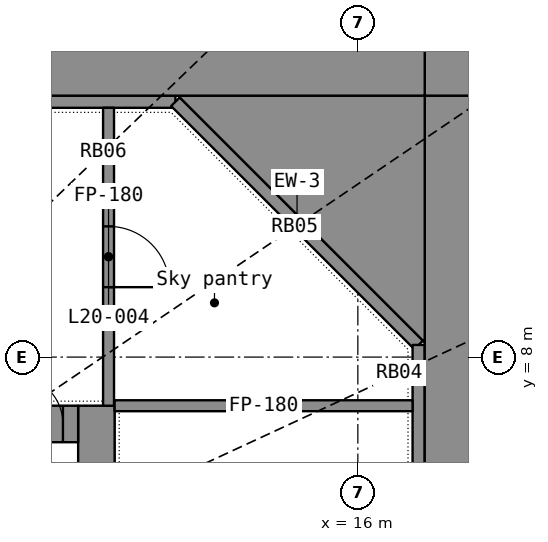
"""IFC4 building model, lengths in metres.
Left out: names, types, materials, properties, quantities, classifications, styles, units other than length and angle.
Written with IfcOpenShell. Run it as: python <this file> out.ifc"""

import sys

from ifc_helpers import new_model, si_unit, direction, frame, frame_2d, origin, place, context, subcontext, project, spatial, polyline, rectangle, outline, extrude, element, fill, save


model = new_model("IFC4")
c1 = context("Model", 3, precision=1e-05, world=origin(), true_north=direction((0.0, 1.0)))
c2 = subcontext(c1, "Body", "Model", "MODEL_VIEW")
j1 = project(units=[si_unit("LENGTHUNIT", "METRE"), si_unit("PLANEANGLEUNIT", "RADIAN")], contexts=[c1])
p1 = place(None, origin())
s1 = spatial("IfcSite", under=j1, at=p1, CompositionType="ELEMENT")
p2 = place(p1, origin())
s2 = spatial("IfcBuilding", under=s1, at=p2, CompositionType="ELEMENT")
p3 = place(p2, frame((0.0, 0.0, 85.2)))
s3 = spatial("IfcBuildingStorey", under=s2, at=p3, CompositionType="ELEMENT", Elevation=85.2)
p4 = place(p3, frame((-13.0, 12.2, 0.08), z_axis=(0.0, 0.0, 1.0), x_axis=(1.0, 0.0, 0.0)))
e1 = element("IfcWall", 1, at=p4, inside=s3, PredefinedType="STANDARD", context=c2, shape_type="SweptSolid", body=[
    extrude(rectangle(XDim=26.0, YDim=0.2, at=frame_2d((13.0, 0.0))), origin(), (0.0, 0.0, 1.0), 7.12),
])
p5 = place(p4, frame((7.1, 0.0, 0.0)))
e2 = element("IfcOpeningElement", 2, at=p5, cuts=e1, PredefinedType="OPENING", context=c2, shape_type="SweptSolid", body=[
    extrude(rectangle(XDim=1.8, YDim=2.4, at=frame_2d((0.9, 1.2))), frame((0.0, 0.11, 0.0), z_axis=(0.0, -1.0, 0.0), x_axis=(1.0, 0.0, 0.0)), (0.0, 0.0, 1.0), 0.22),
])
p6 = place(p4, frame((17.1, 0.0, 0.0)))
e3 = element("IfcOpeningElement", 3, at=p6, cuts=e1, PredefinedType="OPENING", context=c2, shape_type="SweptSolid", body=[
    extrude(rectangle(XDim=1.8, YDim=2.4, at=frame_2d((0.9, 1.2))), frame((0.0, 0.11, 0.0), z_axis=(0.0, -1.0, 0.0), x_axis=(1.0, 0.0, 0.0)), (0.0, 0.0, 1.0), 0.22),
])
p7 = place(p4, frame((3.3, 0.0, 0.9)))
e4 = element("IfcOpeningElement", 4, at=p7, cuts=e1, PredefinedType="OPENING", context=c2, shape_type="SweptSolid", body=[
    extrude(rectangle(XDim=2.4, YDim=1.5, at=frame_2d((1.2, 0.75))), frame((0.0, 0.11, 0.0), z_axis=(0.0, -1.0, 0.0), x_axis=(1.0, 0.0, 0.0)), (0.0, 0.0, 1.0), 0.22),
])
p8 = place(p4, frame((11.8, 0.0, 0.9)))
e5 = element("IfcOpeningElement", 5, at=p8, cuts=e1, PredefinedType="OPENING", context=c2, shape_type="SweptSolid", body=[
    extrude(rectangle(XDim=2.4, YDim=1.5, at=frame_2d((1.2, 0.75))), frame((0.0, 0.11, 0.0), z_axis=(0.0, -1.0, 0.0), x_axis=(1.0, 0.0, 0.0)), (0.0, 0.0, 1.0), 0.22),
])
p9 = place(p4, frame((20.3, 0.0, 0.9)))
e6 = element("IfcOpeningElement", 6, at=p9, cuts=e1, PredefinedType="OPENING", context=c2, shape_type="SweptSolid", body=[
    extrude(rectangle(XDim=2.4, YDim=1.5, at=frame_2d((1.2, 0.75))), frame((0.0, 0.11, 0.0), z_axis=(0.0, -1.0, 0.0), x_axis=(1.0, 0.0, 0.0)), (0.0, 0.0, 1.0), 0.22),
])
p10 = place(p4, frame((6.5, 0.0, 3.2)))
e7 = element("IfcOpeningElement", 7, at=p10, cuts=e1, PredefinedType="OPENING", context=c2, shape_type="SweptSolid", body=[
    extrude(rectangle(XDim=3.0, YDim=1.0, at=frame_2d((1.5, 0.5))), frame((0.0, 0.11, 0.0), z_axis=(0.0, -1.0, 0.0), x_axis=(1.0, 0.0, 0.0)), (0.0, 0.0, 1.0), 0.22),
])
p11 = place(p4, frame((16.5, 0.0, 3.2)))
e8 = element("IfcOpeningElement", 8, at=p11, cuts=e1, PredefinedType="OPENING", context=c2, shape_type="SweptSolid", body=[
    extrude(rectangle(XDim=3.0, YDim=1.0, at=frame_2d((1.5, 0.5))), frame((0.0, 0.11, 0.0), z_axis=(0.0, -1.0, 0.0), x_axis=(1.0, 0.0, 0.0)), (0.0, 0.0, 1.0), 0.22),
])
p12 = place(p3, frame((13.0, 12.2, 0.08), z_axis=(0.0, 0.0, 1.0), x_axis=(0.707106781, -0.707106781, 0.0)))
e9 = element("IfcWall", 9, at=p12, inside=s3, PredefinedType="STANDARD", context=c2, shape_type="SweptSolid", body=[
    extrude(rectangle(XDim=5.657, YDim=0.2, at=frame_2d((2.828, 0.0))), origin(), (0.0, 0.0, 1.0), 7.12),
])
p13 = place(p3, frame((17.0, 8.2, 0.08), z_axis=(0.0, 0.0, 1.0), x_axis=(0.0, -1.0, 0.0)))
e10 = element("IfcWall", 10, at=p13, inside=s3, PredefinedType="STANDARD", context=c2, shape_type="SweptSolid", body=[
    extrude(rectangle(XDim=16.4, YDim=0.2, at=frame_2d((8.2, 0.0))), origin(), (0.0, 0.0, 1.0), 7.12),
])
p14 = place(p13, frame((7.3, 0.0, 0.0)))
e11 = element("IfcOpeningElement", 11, at=p14, cuts=e10, PredefinedType="OPENING", context=c2, shape_type="SweptSolid", body=[
    extrude(rectangle(XDim=1.8, YDim=2.4, at=frame_2d((0.9, 1.2))), frame((0.0, 0.11, 0.0), z_axis=(0.0, -1.0, 0.0), x_axis=(1.0, 0.0, 0.0)), (0.0, 0.0, 1.0), 0.22),
])
p15 = place(p13, frame((3.4, 0.0, 0.1)))
e12 = element("IfcOpeningElement", 12, at=p15, cuts=e10, PredefinedType="OPENING", context=c2, shape_type="SweptSolid", body=[
    extrude(rectangle(XDim=1.2, YDim=2.2, at=frame_2d((0.6, 1.1))), frame((0.0, 0.11, 0.0), z_axis=(0.0, -1.0, 0.0), x_axis=(1.0, 0.0, 0.0)), (0.0, 0.0, 1.0), 0.22),
])
p16 = place(p13, frame((11.8, 0.0, 0.1)))
e13 = element("IfcOpeningElement", 13, at=p16, cuts=e10, PredefinedType="OPENING", context=c2, shape_type="SweptSolid", body=[
    extrude(rectangle(XDim=1.2, YDim=2.2, at=frame_2d((0.6, 1.1))), frame((0.0, 0.11, 0.0), z_axis=(0.0, -1.0, 0.0), x_axis=(1.0, 0.0, 0.0)), (0.0, 0.0, 1.0), 0.22),
])
p17 = place(p3, frame((0.0, 0.0, -0.4)))
e14 = element("IfcWall", 14, at=p17, inside=s3, PredefinedType="ELEMENTEDWALL", context=c2, shape_type="SweptSolid", body=[
    extrude(outline(polyline([(20.321, 12.3), (17.1, 12.3), (17.1, 8.241), (17.1, 0.9), (24.393, 0.9), (24.393, 1.1), (25.32, 1.1), (25.283, 1.794), (25.125, 2.764), (24.557, 2.764), (24.557, 4.464), (24.75, 4.464), (24.515, 5.327), (24.146, 6.275), (23.409, 6.275), (23.409, 7.901), (23.001, 8.698), (22.706, 9.158), (21.031, 9.158), (21.031, 11.358), (21.14, 11.358), (20.79, 11.804), (20.321, 12.3)])), origin(), (0.0, 0.0, 1.0), 1.58),
])
p18 = place(p3, frame((0.0, 0.0, -0.4)))
e15 = element("IfcWall", 15, at=p18, inside=s3, PredefinedType="ELEMENTEDWALL", context=c2, shape_type="SweptSolid", body=[
    extrude(outline(polyline([(17.1, 8.241), (17.1, 12.3), (13.042, 12.3), (17.1, 8.241)])), origin(), (0.0, 0.0, 1.0), 1.58),
])
p19 = place(p3, frame((0.0, 0.0, -0.4)))
e16 = element("IfcWall", 16, at=p19, inside=s3, PredefinedType="ELEMENTEDWALL", context=c2, shape_type="SweptSolid", body=[
    extrude(outline(polyline([(17.1, 15.177), (17.1, 12.3), (20.321, 12.3), (20.056, 12.579), (18.963, 12.579), (18.963, 13.653), (17.946, 14.553), (17.105, 15.177), (17.1, 15.177)])), origin(), (0.0, 0.0, 1.0), 1.58),
])
p20 = place(p3, frame((0.0, 0.0, -0.4)))
e17 = element("IfcWall", 17, at=p20, inside=s3, PredefinedType="ELEMENTEDWALL", context=c2, shape_type="SweptSolid", body=[
    extrude(outline(polyline([(8.017, 19.509), (6.569, 19.879), (5.9, 20.0), (5.9, 12.3), (13.042, 12.3), (17.1, 12.3), (17.1, 15.177), (15.791, 15.177), (15.791, 16.091), (14.557, 16.859), (13.927, 17.184), (13.927, 16.77), (11.726, 16.77), (11.726, 18.23), (10.726, 18.652), (9.717, 18.991), (9.717, 18.853), (8.017, 18.853), (8.017, 19.509)])), origin(), (0.0, 0.0, 1.0), 1.58),
])
p21 = place(p3, frame((11.7, -7.2, 0.0), z_axis=(0.0, 0.0, 1.0), x_axis=(0.0, 1.0, 0.0)))
e18 = element("IfcWall", 18, at=p21, inside=s3, PredefinedType="SHEAR", context=c2, shape_type="SweptSolid", body=[
    extrude(rectangle(XDim=14.4, YDim=0.6, at=frame_2d((7.2, 0.0))), origin(), (0.0, 0.0, 1.0), 7.0),
])
p22 = place(p21, frame((6.5, 0.0, 0.0)))
e19 = element("IfcOpeningElement", 19, at=p22, cuts=e18, PredefinedType="OPENING", context=c2, shape_type="SweptSolid", body=[
    extrude(rectangle(XDim=1.4, YDim=2.2, at=frame_2d((0.7, 1.1))), frame((0.0, 0.31, 0.0), z_axis=(0.0, -1.0, 0.0), x_axis=(1.0, 0.0, 0.0)), (0.0, 0.0, 1.0), 0.62),
])
p23 = place(p3, frame((-11.4, 6.9, 0.0), z_axis=(0.0, 0.0, 1.0), x_axis=(1.0, 0.0, 0.0)))
e20 = element("IfcWall", 20, at=p23, inside=s3, PredefinedType="SHEAR", context=c2, shape_type="SweptSolid", body=[
    extrude(rectangle(XDim=22.8, YDim=0.6, at=frame_2d((11.4, 0.0))), origin(), (0.0, 0.0, 1.0), 7.0),
])
p24 = place(p23, frame((1.85, 0.0, 0.0)))
e21 = element("IfcOpeningElement", 21, at=p24, cuts=e20, PredefinedType="OPENING", context=c2, shape_type="SweptSolid", body=[
    extrude(rectangle(XDim=1.1, YDim=2.2, at=frame_2d((0.55, 1.1))), frame((0.0, 0.31, 0.0), z_axis=(0.0, -1.0, 0.0), x_axis=(1.0, 0.0, 0.0)), (0.0, 0.0, 1.0), 0.62),
])
p25 = place(p23, frame((7.95, 0.0, 0.0)))
e22 = element("IfcOpeningElement", 22, at=p25, cuts=e20, PredefinedType="OPENING", context=c2, shape_type="SweptSolid", body=[
    extrude(rectangle(XDim=0.9, YDim=2.1, at=frame_2d((0.45, 1.05))), frame((0.0, 0.31, 0.0), z_axis=(0.0, -1.0, 0.0), x_axis=(1.0, 0.0, 0.0)), (0.0, 0.0, 1.0), 0.62),
])
p26 = place(p23, frame((15.95, 0.0, 0.0)))
e23 = element("IfcOpeningElement", 23, at=p26, cuts=e20, PredefinedType="OPENING", context=c2, shape_type="SweptSolid", body=[
    extrude(rectangle(XDim=0.9, YDim=2.1, at=frame_2d((0.45, 1.05))), frame((0.0, 0.31, 0.0), z_axis=(0.0, -1.0, 0.0), x_axis=(1.0, 0.0, 0.0)), (0.0, 0.0, 1.0), 0.62),
])
p27 = place(p23, frame((0.25, 0.0, 0.0)))
e24 = element("IfcOpeningElement", 24, at=p27, cuts=e20, PredefinedType="OPENING", context=c2, shape_type="SweptSolid", body=[
    extrude(rectangle(XDim=0.8, YDim=2.05, at=frame_2d((0.4, 1.025))), frame((0.0, 0.31, 0.0), z_axis=(0.0, -1.0, 0.0), x_axis=(1.0, 0.0, 0.0)), (0.0, 0.0, 1.0), 0.62),
])
p28 = place(p23, frame((21.75, 0.0, 0.0)))
e25 = element("IfcOpeningElement", 25, at=p28, cuts=e20, PredefinedType="OPENING", context=c2, shape_type="SweptSolid", body=[
    extrude(rectangle(XDim=0.8, YDim=2.05, at=frame_2d((0.4, 1.025))), frame((0.0, 0.31, 0.0), z_axis=(0.0, -1.0, 0.0), x_axis=(1.0, 0.0, 0.0)), (0.0, 0.0, 1.0), 0.62),
])
p29 = place(p3, frame((11.9, 12.1, 0.0), z_axis=(0.0, 0.0, 1.0), x_axis=(0.0, -1.0, 0.0)))
e26 = element("IfcWall", 26, at=p29, inside=s3, PredefinedType="PARTITIONING", context=c2, shape_type="SweptSolid", body=[
    extrude(rectangle(XDim=4.9, YDim=0.18, at=frame_2d((2.45, 0.0))), origin(), (0.0, 0.0, 1.0), 6.1),
])
p30 = place(p29, frame((1.95, 0.0, 0.0)))
e27 = element("IfcOpeningElement", 27, at=p30, cuts=e26, PredefinedType="OPENING", context=c2, shape_type="SweptSolid", body=[
    extrude(rectangle(XDim=1.0, YDim=2.1, at=frame_2d((0.5, 1.05))), frame((0.0, 0.1, 0.0), z_axis=(0.0, -1.0, 0.0), x_axis=(1.0, 0.0, 0.0)), (0.0, 0.0, 1.0), 0.2),
])
p31 = place(p3, frame((12.0, 7.2, 0.0), z_axis=(0.0, 0.0, 1.0), x_axis=(1.0, 0.0, 0.0)))
e28 = element("IfcWall", 28, at=p31, inside=s3, PredefinedType="PARTITIONING", context=c2, shape_type="SweptSolid", body=[
    extrude(rectangle(XDim=4.9, YDim=0.18, at=frame_2d((2.45, 0.0))), origin(), (0.0, 0.0, 1.0), 6.1),
])
p32 = place(p28, origin())
e29 = element("IfcDoor", 29, at=p32, inside=s3, OperationType="SINGLE_SWING_LEFT", PredefinedType="DOOR", context=c2, shape_type="SweptSolid", body=[
    extrude(rectangle(XDim=0.8, YDim=2.05, at=frame_2d((0.4, 1.025))), frame((0.0, 0.025, 0.0), z_axis=(0.0, -1.0, 0.0), x_axis=(1.0, 0.0, 0.0)), (0.0, 0.0, 1.0), 0.05),
])
fill(e25, e29)
p33 = place(p30, origin())
e30 = element("IfcDoor", 30, at=p33, inside=s3, OperationType="SINGLE_SWING_RIGHT", PredefinedType="DOOR", context=c2, shape_type="SweptSolid", body=[
    extrude(rectangle(XDim=1.0, YDim=2.1, at=frame_2d((0.5, 1.05))), frame((0.0, 0.025, 0.0), z_axis=(0.0, -1.0, 0.0), x_axis=(1.0, 0.0, 0.0)), (0.0, 0.0, 1.0), 0.05),
])
fill(e27, e30)
save(model, sys.argv[1])
